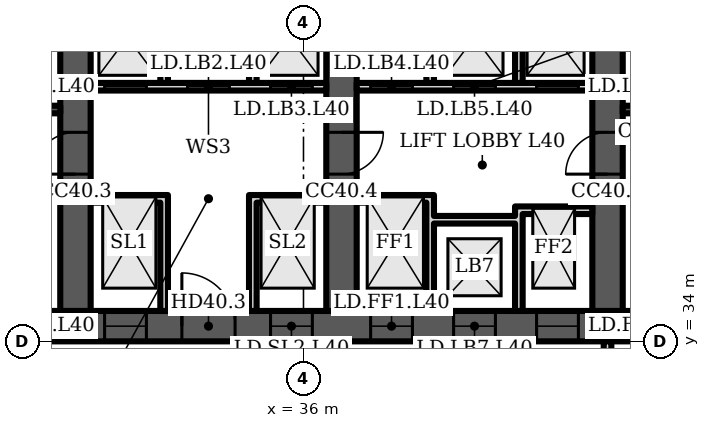
"""IFC4 building model, lengths in metres.
Left out: names, types, materials, properties, quantities, classifications, styles, units other than length and angle.
Written with IfcOpenShell. Run it as: python <this file> out.ifc"""

import sys

from ifc_helpers import new_model, si_unit, direction, frame, frame_2d, origin, place, context, subcontext, project, spatial, polyline, rectangle, outline, extrude, element, fill, save


model = new_model("IFC4")
c1 = context("Model", 3, precision=1e-05, world=origin(), true_north=direction((0.0, 1.0)))
c2 = subcontext(c1, "Body", "Model", "MODEL_VIEW")
j1 = project(units=[si_unit("LENGTHUNIT", "METRE"), si_unit("PLANEANGLEUNIT", "RADIAN")], contexts=[c1])
p1 = place(None, origin())
s1 = spatial("IfcSite", under=j1, at=p1, CompositionType="ELEMENT")
p2 = place(p1, origin())
s2 = spatial("IfcBuilding", under=s1, at=p2, CompositionType="ELEMENT")
p3 = place(p2, frame((0.0, 0.0, 166.3)))
s3 = spatial("IfcBuildingStorey", under=s2, at=p3, CompositionType="ELEMENT", Elevation=166.3)
p4 = place(p3, frame((16.0, 34.4, 0.0), z_axis=(0.0, 0.0, 1.0), x_axis=(1.0, 0.0, 0.0)))
e1 = element("IfcWall", 1, at=p4, inside=s3, PredefinedType="SHEAR", context=c2, shape_type="SweptSolid", body=[
    extrude(rectangle(XDim=42.0, YDim=0.8, at=frame_2d((21.0, 0.0))), origin(), (0.0, 0.0, 1.0), 3.6),
])
p5 = place(p4, frame((3.2, 0.0, 0.0)))
e2 = element("IfcOpeningElement", 2, at=p5, cuts=e1, PredefinedType="OPENING", context=c2, shape_type="SweptSolid", body=[
    extrude(rectangle(XDim=1.0, YDim=2.1, at=frame_2d((0.5, 1.05))), frame((0.0, 0.41, 0.0), z_axis=(0.0, -1.0, 0.0), x_axis=(1.0, 0.0, 0.0)), (0.0, 0.0, 1.0), 0.82),
])
p6 = place(p4, frame((7.65, 0.0, 0.0)))
e3 = element("IfcOpeningElement", 3, at=p6, cuts=e1, PredefinedType="OPENING", context=c2, shape_type="SweptSolid", body=[
    extrude(rectangle(XDim=1.2, YDim=2.1, at=frame_2d((0.6, 1.05))), frame((0.0, 0.41, 0.0), z_axis=(0.0, -1.0, 0.0), x_axis=(1.0, 0.0, 0.0)), (0.0, 0.0, 1.0), 0.82),
])
p7 = place(p4, frame((14.767, 0.0, 0.0)))
e4 = element("IfcOpeningElement", 4, at=p7, cuts=e1, PredefinedType="OPENING", context=c2, shape_type="SweptSolid", body=[
    extrude(rectangle(XDim=1.1, YDim=2.1, at=frame_2d((0.55, 1.05))), frame((0.0, 0.41, 0.0), z_axis=(0.0, -1.0, 0.0), x_axis=(1.0, 0.0, 0.0)), (0.0, 0.0, 1.0), 0.82),
])
p8 = place(p4, frame((19.133, 0.0, 0.0)))
e5 = element("IfcOpeningElement", 5, at=p8, cuts=e1, PredefinedType="OPENING", context=c2, shape_type="SweptSolid", body=[
    extrude(rectangle(XDim=1.1, YDim=2.1, at=frame_2d((0.55, 1.05))), frame((0.0, 0.41, 0.0), z_axis=(0.0, -1.0, 0.0), x_axis=(1.0, 0.0, 0.0)), (0.0, 0.0, 1.0), 0.82),
])
p9 = place(p4, frame((16.8, 0.0, 0.0)))
e6 = element("IfcOpeningElement", 6, at=p9, cuts=e1, PredefinedType="OPENING", context=c2, shape_type="SweptSolid", body=[
    extrude(rectangle(XDim=1.4, YDim=2.1, at=frame_2d((0.7, 1.05))), frame((0.0, 0.41, 0.0), z_axis=(0.0, -1.0, 0.0), x_axis=(1.0, 0.0, 0.0)), (0.0, 0.0, 1.0), 0.82),
])
p10 = place(p4, frame((21.767, 0.0, 0.0)))
e7 = element("IfcOpeningElement", 7, at=p10, cuts=e1, PredefinedType="OPENING", context=c2, shape_type="SweptSolid", body=[
    extrude(rectangle(XDim=1.1, YDim=2.1, at=frame_2d((0.55, 1.05))), frame((0.0, 0.41, 0.0), z_axis=(0.0, -1.0, 0.0), x_axis=(1.0, 0.0, 0.0)), (0.0, 0.0, 1.0), 0.82),
])
p11 = place(p4, frame((23.95, 0.0, 0.0)))
e8 = element("IfcOpeningElement", 8, at=p11, cuts=e1, PredefinedType="OPENING", context=c2, shape_type="SweptSolid", body=[
    extrude(rectangle(XDim=1.1, YDim=2.1, at=frame_2d((0.55, 1.05))), frame((0.0, 0.41, 0.0), z_axis=(0.0, -1.0, 0.0), x_axis=(1.0, 0.0, 0.0)), (0.0, 0.0, 1.0), 0.82),
])
p12 = place(p4, frame((26.133, 0.0, 0.0)))
e9 = element("IfcOpeningElement", 9, at=p12, cuts=e1, PredefinedType="OPENING", context=c2, shape_type="SweptSolid", body=[
    extrude(rectangle(XDim=1.1, YDim=2.1, at=frame_2d((0.55, 1.05))), frame((0.0, 0.41, 0.0), z_axis=(0.0, -1.0, 0.0), x_axis=(1.0, 0.0, 0.0)), (0.0, 0.0, 1.0), 0.82),
])
p13 = place(p4, frame((33.15, 0.0, 0.0)))
e10 = element("IfcOpeningElement", 10, at=p13, cuts=e1, PredefinedType="OPENING", context=c2, shape_type="SweptSolid", body=[
    extrude(rectangle(XDim=1.2, YDim=2.1, at=frame_2d((0.6, 1.05))), frame((0.0, 0.41, 0.0), z_axis=(0.0, -1.0, 0.0), x_axis=(1.0, 0.0, 0.0)), (0.0, 0.0, 1.0), 0.82),
])
p14 = place(p4, frame((35.817, 0.0, 0.0)))
e11 = element("IfcOpeningElement", 11, at=p14, cuts=e1, PredefinedType="OPENING", context=c2, shape_type="SweptSolid", body=[
    extrude(rectangle(XDim=1.0, YDim=2.1, at=frame_2d((0.5, 1.05))), frame((0.0, 0.41, 0.0), z_axis=(0.0, -1.0, 0.0), x_axis=(1.0, 0.0, 0.0)), (0.0, 0.0, 1.0), 0.82),
])
p15 = place(p4, frame((39.95, 0.0, 0.0)))
e12 = element("IfcOpeningElement", 12, at=p15, cuts=e1, PredefinedType="OPENING", context=c2, shape_type="SweptSolid", body=[
    extrude(rectangle(XDim=1.0, YDim=2.1, at=frame_2d((0.5, 1.05))), frame((0.0, 0.41, 0.0), z_axis=(0.0, -1.0, 0.0), x_axis=(1.0, 0.0, 0.0)), (0.0, 0.0, 1.0), 0.82),
])
p16 = place(p4, frame((37.767, 0.0, 0.0)))
e13 = element("IfcOpeningElement", 13, at=p16, cuts=e1, PredefinedType="OPENING", context=c2, shape_type="SweptSolid", body=[
    extrude(rectangle(XDim=1.4, YDim=2.1, at=frame_2d((0.7, 1.05))), frame((0.0, 0.41, 0.0), z_axis=(0.0, -1.0, 0.0), x_axis=(1.0, 0.0, 0.0)), (0.0, 0.0, 1.0), 0.82),
])
p17 = place(p3, frame((30.0, 34.8, 0.0), z_axis=(0.0, 0.0, 1.0), x_axis=(0.0, 1.0, 0.0)))
e14 = element("IfcWall", 14, at=p17, inside=s3, PredefinedType="SHEAR", context=c2, shape_type="SweptSolid", body=[
    extrude(rectangle(XDim=14.374, YDim=0.8, at=frame_2d((7.187, 0.0))), origin(), (0.0, 0.0, 1.0), 3.6),
])
p18 = place(p17, frame((3.6, 0.0, 0.0)))
e15 = element("IfcOpeningElement", 15, at=p18, cuts=e14, PredefinedType="OPENING", context=c2, shape_type="SweptSolid", body=[
    extrude(rectangle(XDim=1.1, YDim=2.1, at=frame_2d((0.55, 1.05))), frame((0.0, 0.41, 0.0), z_axis=(0.0, -1.0, 0.0), x_axis=(1.0, 0.0, 0.0)), (0.0, 0.0, 1.0), 0.82),
])
p19 = place(p3, frame((37.0, 34.8, 0.0), z_axis=(0.0, 0.0, 1.0), x_axis=(0.0, 1.0, 0.0)))
e16 = element("IfcWall", 16, at=p19, inside=s3, PredefinedType="SHEAR", context=c2, shape_type="SweptSolid", body=[
    extrude(rectangle(XDim=14.987, YDim=0.8, at=frame_2d((7.493, 0.0))), origin(), (0.0, 0.0, 1.0), 3.6),
])
p20 = place(p19, frame((11.312, 0.0, 0.0)))
e17 = element("IfcOpeningElement", 17, at=p20, cuts=e16, PredefinedType="OPENING", context=c2, shape_type="SweptSolid", body=[
    extrude(rectangle(XDim=1.0, YDim=2.1, at=frame_2d((0.5, 1.05))), frame((0.0, 0.41, 0.0), z_axis=(0.0, -1.0, 0.0), x_axis=(1.0, 0.0, 0.0)), (0.0, 0.0, 1.0), 0.82),
])
p21 = place(p19, frame((3.6, 0.0, 0.0)))
e18 = element("IfcOpeningElement", 18, at=p21, cuts=e16, PredefinedType="OPENING", context=c2, shape_type="SweptSolid", body=[
    extrude(rectangle(XDim=1.1, YDim=2.1, at=frame_2d((0.55, 1.05))), frame((0.0, 0.41, 0.0), z_axis=(0.0, -1.0, 0.0), x_axis=(1.0, 0.0, 0.0)), (0.0, 0.0, 1.0), 0.82),
])
p22 = place(p3, frame((44.0, 34.8, 0.0), z_axis=(0.0, 0.0, 1.0), x_axis=(0.0, 1.0, 0.0)))
e19 = element("IfcWall", 19, at=p22, inside=s3, PredefinedType="SHEAR", context=c2, shape_type="SweptSolid", body=[
    extrude(rectangle(XDim=14.374, YDim=0.8, at=frame_2d((7.187, 0.0))), origin(), (0.0, 0.0, 1.0), 3.6),
])
p23 = place(p22, frame((11.312, 0.0, 0.0)))
e20 = element("IfcOpeningElement", 20, at=p23, cuts=e19, PredefinedType="OPENING", context=c2, shape_type="SweptSolid", body=[
    extrude(rectangle(XDim=1.0, YDim=2.1, at=frame_2d((0.5, 1.05))), frame((0.0, 0.41, 0.0), z_axis=(0.0, -1.0, 0.0), x_axis=(1.0, 0.0, 0.0)), (0.0, 0.0, 1.0), 0.82),
])
p24 = place(p22, frame((3.6, 0.0, 0.0)))
e21 = element("IfcOpeningElement", 21, at=p24, cuts=e19, PredefinedType="OPENING", context=c2, shape_type="SweptSolid", body=[
    extrude(rectangle(XDim=1.1, YDim=2.1, at=frame_2d((0.55, 1.05))), frame((0.0, 0.41, 0.0), z_axis=(0.0, -1.0, 0.0), x_axis=(1.0, 0.0, 0.0)), (0.0, 0.0, 1.0), 0.82),
])
p25 = place(p3, frame((23.4, 40.1, 0.0), z_axis=(0.0, 0.0, 1.0), x_axis=(1.0, 0.0, 0.0)))
e22 = element("IfcWall", 22, at=p25, inside=s3, PredefinedType="SHEAR", context=c2, shape_type="SweptSolid", body=[
    extrude(rectangle(XDim=6.2, YDim=0.2, at=frame_2d((3.1, 0.0))), origin(), (0.0, 0.0, 1.0), 3.2),
])
p26 = place(p25, frame((3.525, 0.0, 0.0)))
e23 = element("IfcOpeningElement", 23, at=p26, cuts=e22, PredefinedType="OPENING", context=c2, shape_type="SweptSolid", body=[
    extrude(rectangle(XDim=1.2, YDim=2.1, at=frame_2d((0.6, 1.05))), frame((0.0, 0.11, 0.0), z_axis=(0.0, -1.0, 0.0), x_axis=(1.0, 0.0, 0.0)), (0.0, 0.0, 1.0), 0.22),
])
p27 = place(p25, frame((0.575, 0.0, 0.0)))
e24 = element("IfcOpeningElement", 24, at=p27, cuts=e22, PredefinedType="OPENING", context=c2, shape_type="SweptSolid", body=[
    extrude(rectangle(XDim=0.9, YDim=2.1, at=frame_2d((0.45, 1.05))), frame((0.0, 0.11, 0.0), z_axis=(0.0, -1.0, 0.0), x_axis=(1.0, 0.0, 0.0)), (0.0, 0.0, 1.0), 0.22),
])
p28 = place(p3, frame((30.4, 40.7, 0.0), z_axis=(0.0, 0.0, 1.0), x_axis=(1.0, 0.0, 0.0)))
e25 = element("IfcWall", 25, at=p28, inside=s3, PredefinedType="PARTITIONING", context=c2, shape_type="SweptSolid", body=[
    extrude(rectangle(XDim=6.2, YDim=0.2, at=frame_2d((3.1, 0.0))), origin(), (0.0, 0.0, 1.0), 3.2),
])
p29 = place(p28, frame((0.367, 0.0, 0.0)))
e26 = element("IfcOpeningElement", 26, at=p29, cuts=e25, PredefinedType="OPENING", context=c2, shape_type="SweptSolid", body=[
    extrude(rectangle(XDim=1.1, YDim=2.1, at=frame_2d((0.55, 1.05))), frame((0.0, 0.11, 0.0), z_axis=(0.0, -1.0, 0.0), x_axis=(1.0, 0.0, 0.0)), (0.0, 0.0, 1.0), 0.22),
])
p30 = place(p28, frame((2.55, 0.0, 0.0)))
e27 = element("IfcOpeningElement", 27, at=p30, cuts=e25, PredefinedType="OPENING", context=c2, shape_type="SweptSolid", body=[
    extrude(rectangle(XDim=1.1, YDim=2.1, at=frame_2d((0.55, 1.05))), frame((0.0, 0.11, 0.0), z_axis=(0.0, -1.0, 0.0), x_axis=(1.0, 0.0, 0.0)), (0.0, 0.0, 1.0), 0.22),
])
p31 = place(p28, frame((4.733, 0.0, 0.0)))
e28 = element("IfcOpeningElement", 28, at=p31, cuts=e25, PredefinedType="OPENING", context=c2, shape_type="SweptSolid", body=[
    extrude(rectangle(XDim=1.1, YDim=2.1, at=frame_2d((0.55, 1.05))), frame((0.0, 0.11, 0.0), z_axis=(0.0, -1.0, 0.0), x_axis=(1.0, 0.0, 0.0)), (0.0, 0.0, 1.0), 0.22),
])
p32 = place(p3, frame((0.0, 0.0, -0.0)))
e29 = element("IfcWall", 29, at=p32, inside=s3, PredefinedType="PARTITIONING", context=c2, shape_type="SweptSolid", body=[
    extrude(outline(polyline([(32.233, 37.65), (30.4, 37.65), (30.4, 37.85), (32.233, 37.85), (32.433, 37.85), (32.433, 34.8), (32.233, 34.8), (32.233, 37.65)])), origin(), (0.0, 0.0, 1.0), 3.2),
])
p33 = place(p3, frame((0.0, 0.0, -0.0)))
e30 = element("IfcWall", 30, at=p33, inside=s3, PredefinedType="PARTITIONING", context=c2, shape_type="SweptSolid", body=[
    extrude(outline(polyline([(34.567, 37.85), (34.767, 37.85), (36.6, 37.85), (36.6, 37.65), (34.767, 37.65), (34.767, 34.8), (34.567, 34.8), (34.567, 37.85)])), origin(), (0.0, 0.0, 1.0), 3.2),
])
p34 = place(p3, frame((0.0, 0.0, -0.0)))
e31 = element("IfcWall", 31, at=p34, inside=s3, PredefinedType="PARTITIONING", context=c2, shape_type="SweptSolid", body=[
    extrude(outline(polyline([(32.433, 40.8), (32.233, 40.8), (32.233, 43.8), (30.4, 43.8), (30.4, 44.0), (36.6, 44.0), (36.6, 43.8), (34.767, 43.8), (34.767, 40.8), (34.567, 40.8), (34.567, 43.8), (32.433, 43.8), (32.433, 40.8)])), origin(), (0.0, 0.0, 1.0), 3.2),
])
p35 = place(p3, frame((37.4, 40.7, 0.0), z_axis=(0.0, 0.0, 1.0), x_axis=(1.0, 0.0, 0.0)))
e32 = element("IfcWall", 32, at=p35, inside=s3, PredefinedType="PARTITIONING", context=c2, shape_type="SweptSolid", body=[
    extrude(rectangle(XDim=6.2, YDim=0.2, at=frame_2d((3.1, 0.0))), origin(), (0.0, 0.0, 1.0), 3.2),
])
p36 = place(p35, frame((0.367, 0.0, 0.0)))
e33 = element("IfcOpeningElement", 33, at=p36, cuts=e32, PredefinedType="OPENING", context=c2, shape_type="SweptSolid", body=[
    extrude(rectangle(XDim=1.1, YDim=2.1, at=frame_2d((0.55, 1.05))), frame((0.0, 0.11, 0.0), z_axis=(0.0, -1.0, 0.0), x_axis=(1.0, 0.0, 0.0)), (0.0, 0.0, 1.0), 0.22),
])
p37 = place(p35, frame((2.55, 0.0, 0.0)))
e34 = element("IfcOpeningElement", 34, at=p37, cuts=e32, PredefinedType="OPENING", context=c2, shape_type="SweptSolid", body=[
    extrude(rectangle(XDim=1.1, YDim=2.1, at=frame_2d((0.55, 1.05))), frame((0.0, 0.11, 0.0), z_axis=(0.0, -1.0, 0.0), x_axis=(1.0, 0.0, 0.0)), (0.0, 0.0, 1.0), 0.22),
])
p38 = place(p35, frame((4.733, 0.0, 0.0)))
e35 = element("IfcOpeningElement", 35, at=p38, cuts=e32, PredefinedType="OPENING", context=c2, shape_type="SweptSolid", body=[
    extrude(rectangle(XDim=1.1, YDim=2.1, at=frame_2d((0.55, 1.05))), frame((0.0, 0.11, 0.0), z_axis=(0.0, -1.0, 0.0), x_axis=(1.0, 0.0, 0.0)), (0.0, 0.0, 1.0), 0.22),
])
p39 = place(p3, frame((0.0, 0.0, -0.0)))
e36 = element("IfcWall", 36, at=p39, inside=s3, PredefinedType="PARTITIONING", context=c2, shape_type="SweptSolid", body=[
    extrude(outline(polyline([(41.567, 37.1), (39.433, 37.1), (39.433, 34.8), (39.233, 34.8), (39.233, 37.65), (37.4, 37.65), (37.4, 37.85), (39.233, 37.85), (39.433, 37.85), (39.433, 37.3), (41.567, 37.3), (41.567, 37.55), (41.767, 37.55), (43.6, 37.55), (43.6, 37.35), (41.767, 37.35), (41.767, 34.8), (41.567, 34.8), (41.567, 37.1)])), origin(), (0.0, 0.0, 1.0), 3.2),
])
p40 = place(p3, frame((0.0, 0.0, -0.0)))
e37 = element("IfcWall", 37, at=p40, inside=s3, PredefinedType="PARTITIONING", context=c2, shape_type="SweptSolid", body=[
    extrude(outline(polyline([(39.433, 40.8), (39.233, 40.8), (39.233, 43.8), (37.4, 43.8), (37.4, 44.0), (43.6, 44.0), (43.6, 43.8), (41.767, 43.8), (41.767, 40.8), (41.567, 40.8), (41.567, 43.8), (39.433, 43.8), (39.433, 40.8)])), origin(), (0.0, 0.0, 1.0), 3.2),
])
p41 = place(p3, frame((44.4, 40.1, 0.0), z_axis=(0.0, 0.0, 1.0), x_axis=(1.0, 0.0, 0.0)))
e38 = element("IfcWall", 38, at=p41, inside=s3, PredefinedType="SHEAR", context=c2, shape_type="SweptSolid", body=[
    extrude(rectangle(XDim=6.2, YDim=0.2, at=frame_2d((3.1, 0.0))), origin(), (0.0, 0.0, 1.0), 3.2),
])
p42 = place(p41, frame((3.525, 0.0, 0.0)))
e39 = element("IfcOpeningElement", 39, at=p42, cuts=e38, PredefinedType="OPENING", context=c2, shape_type="SweptSolid", body=[
    extrude(rectangle(XDim=1.2, YDim=2.1, at=frame_2d((0.6, 1.05))), frame((0.0, 0.11, 0.0), z_axis=(0.0, -1.0, 0.0), x_axis=(1.0, 0.0, 0.0)), (0.0, 0.0, 1.0), 0.22),
])
p43 = place(p41, frame((0.575, 0.0, 0.0)))
e40 = element("IfcOpeningElement", 40, at=p43, cuts=e38, PredefinedType="OPENING", context=c2, shape_type="SweptSolid", body=[
    extrude(rectangle(XDim=0.9, YDim=2.1, at=frame_2d((0.45, 1.05))), frame((0.0, 0.11, 0.0), z_axis=(0.0, -1.0, 0.0), x_axis=(1.0, 0.0, 0.0)), (0.0, 0.0, 1.0), 0.22),
])
p44 = place(p3, frame((37.0, 30.5, 0.0), z_axis=(0.0, 0.0, 1.0), x_axis=(0.0, 1.0, 0.0)))
e41 = element("IfcWall", 41, at=p44, inside=s3, PredefinedType="PARTITIONING", context=c2, shape_type="SweptSolid", body=[
    extrude(rectangle(XDim=3.5, YDim=0.2, at=frame_2d((1.75, 0.0))), origin(), (0.0, 0.0, 1.0), 3.2),
])
p45 = place(p44, frame((1.2, 0.0, 0.0)))
e42 = element("IfcOpeningElement", 42, at=p45, cuts=e41, PredefinedType="OPENING", context=c2, shape_type="SweptSolid", body=[
    extrude(rectangle(XDim=1.1, YDim=2.1, at=frame_2d((0.55, 1.05))), frame((0.0, 0.11, 0.0), z_axis=(0.0, -1.0, 0.0), x_axis=(1.0, 0.0, 0.0)), (0.0, 0.0, 1.0), 0.22),
])
for number, where, z_axis, x_axis in (
    (43, (40.0, 30.5, 0.0), (0.0, 0.0, 1.0), (0.0, 1.0, 0.0)),
    (44, (41.0, 30.5, 0.0), (0.0, 0.0, 1.0), (0.0, 1.0, 0.0)),
):
    element("IfcWall", number, at=place(p3, frame(where, z_axis=z_axis, x_axis=x_axis)), inside=s3, PredefinedType="PARTITIONING", context=c2, shape_type="SweptSolid", body=[
        extrude(rectangle(XDim=3.5, YDim=0.2, at=frame_2d((1.75, 0.0))), origin(), (0.0, 0.0, 1.0), 3.2),
    ])
p46 = place(p3, frame((44.0, 30.5, 0.0), z_axis=(0.0, 0.0, 1.0), x_axis=(0.0, 1.0, 0.0)))
e45 = element("IfcWall", 45, at=p46, inside=s3, PredefinedType="PARTITIONING", context=c2, shape_type="SweptSolid", body=[
    extrude(rectangle(XDim=3.5, YDim=0.2, at=frame_2d((1.75, 0.0))), origin(), (0.0, 0.0, 1.0), 3.2),
])
p47 = place(p46, frame((1.2, 0.0, 0.0)))
e46 = element("IfcOpeningElement", 46, at=p47, cuts=e45, PredefinedType="OPENING", context=c2, shape_type="SweptSolid", body=[
    extrude(rectangle(XDim=1.1, YDim=2.1, at=frame_2d((0.55, 1.05))), frame((0.0, 0.11, 0.0), z_axis=(0.0, -1.0, 0.0), x_axis=(1.0, 0.0, 0.0)), (0.0, 0.0, 1.0), 0.22),
])
p48 = place(p7, origin())
e47 = element("IfcDoor", 47, at=p48, inside=s3, OperationType="DOUBLE_DOOR_SLIDING", PredefinedType="DOOR", context=c2, shape_type="SweptSolid", body=[
    extrude(rectangle(XDim=1.1, YDim=2.1, at=frame_2d((0.55, 1.05))), frame((0.0, 0.025, 0.0), z_axis=(0.0, -1.0, 0.0), x_axis=(1.0, 0.0, 0.0)), (0.0, 0.0, 1.0), 0.05),
])
fill(e4, e47)
p49 = place(p8, origin())
e48 = element("IfcDoor", 48, at=p49, inside=s3, OperationType="DOUBLE_DOOR_SLIDING", PredefinedType="DOOR", context=c2, shape_type="SweptSolid", body=[
    extrude(rectangle(XDim=1.1, YDim=2.1, at=frame_2d((0.55, 1.05))), frame((0.0, 0.025, 0.0), z_axis=(0.0, -1.0, 0.0), x_axis=(1.0, 0.0, 0.0)), (0.0, 0.0, 1.0), 0.05),
])
fill(e5, e48)
p50 = place(p9, origin())
e49 = element("IfcDoor", 49, at=p50, inside=s3, OperationType="DOUBLE_DOOR_SINGLE_SWING", PredefinedType="DOOR", context=c2, shape_type="SweptSolid", body=[
    extrude(rectangle(XDim=1.4, YDim=2.1, at=frame_2d((0.7, 1.05))), frame((0.0, 0.025, 0.0), z_axis=(0.0, -1.0, 0.0), x_axis=(1.0, 0.0, 0.0)), (0.0, 0.0, 1.0), 0.05),
])
fill(e6, e49)
p51 = place(p29, origin())
e50 = element("IfcDoor", 50, at=p51, inside=s3, OperationType="DOUBLE_DOOR_SLIDING", PredefinedType="DOOR", context=c2, shape_type="SweptSolid", body=[
    extrude(rectangle(XDim=1.1, YDim=2.1, at=frame_2d((0.55, 1.05))), frame((0.0, 0.025, 0.0), z_axis=(0.0, -1.0, 0.0), x_axis=(1.0, 0.0, 0.0)), (0.0, 0.0, 1.0), 0.05),
])
fill(e26, e50)
p52 = place(p30, origin())
e51 = element("IfcDoor", 51, at=p52, inside=s3, OperationType="DOUBLE_DOOR_SLIDING", PredefinedType="DOOR", context=c2, shape_type="SweptSolid", body=[
    extrude(rectangle(XDim=1.1, YDim=2.1, at=frame_2d((0.55, 1.05))), frame((0.0, 0.025, 0.0), z_axis=(0.0, -1.0, 0.0), x_axis=(1.0, 0.0, 0.0)), (0.0, 0.0, 1.0), 0.05),
])
fill(e27, e51)
p53 = place(p31, origin())
e52 = element("IfcDoor", 52, at=p53, inside=s3, OperationType="DOUBLE_DOOR_SLIDING", PredefinedType="DOOR", context=c2, shape_type="SweptSolid", body=[
    extrude(rectangle(XDim=1.1, YDim=2.1, at=frame_2d((0.55, 1.05))), frame((0.0, 0.025, 0.0), z_axis=(0.0, -1.0, 0.0), x_axis=(1.0, 0.0, 0.0)), (0.0, 0.0, 1.0), 0.05),
])
fill(e28, e52)
p54 = place(p10, origin())
e53 = element("IfcDoor", 53, at=p54, inside=s3, OperationType="DOUBLE_DOOR_SLIDING", PredefinedType="DOOR", context=c2, shape_type="SweptSolid", body=[
    extrude(rectangle(XDim=1.1, YDim=2.1, at=frame_2d((0.55, 1.05))), frame((0.0, 0.025, 0.0), z_axis=(0.0, -1.0, 0.0), x_axis=(1.0, 0.0, 0.0)), (0.0, 0.0, 1.0), 0.05),
])
fill(e7, e53)
p55 = place(p11, origin())
e54 = element("IfcDoor", 54, at=p55, inside=s3, OperationType="DOUBLE_DOOR_SLIDING", PredefinedType="DOOR", context=c2, shape_type="SweptSolid", body=[
    extrude(rectangle(XDim=1.1, YDim=2.1, at=frame_2d((0.55, 1.05))), frame((0.0, 0.025, 0.0), z_axis=(0.0, -1.0, 0.0), x_axis=(1.0, 0.0, 0.0)), (0.0, 0.0, 1.0), 0.05),
])
fill(e8, e54)
p56 = place(p12, origin())
e55 = element("IfcDoor", 55, at=p56, inside=s3, OperationType="DOUBLE_DOOR_SLIDING", PredefinedType="DOOR", context=c2, shape_type="SweptSolid", body=[
    extrude(rectangle(XDim=1.1, YDim=2.1, at=frame_2d((0.55, 1.05))), frame((0.0, 0.025, 0.0), z_axis=(0.0, -1.0, 0.0), x_axis=(1.0, 0.0, 0.0)), (0.0, 0.0, 1.0), 0.05),
])
fill(e9, e55)
p57 = place(p36, origin())
e56 = element("IfcDoor", 56, at=p57, inside=s3, OperationType="DOUBLE_DOOR_SLIDING", PredefinedType="DOOR", context=c2, shape_type="SweptSolid", body=[
    extrude(rectangle(XDim=1.1, YDim=2.1, at=frame_2d((0.55, 1.05))), frame((0.0, 0.025, 0.0), z_axis=(0.0, -1.0, 0.0), x_axis=(1.0, 0.0, 0.0)), (0.0, 0.0, 1.0), 0.05),
])
fill(e33, e56)
p58 = place(p37, origin())
e57 = element("IfcDoor", 57, at=p58, inside=s3, OperationType="DOUBLE_DOOR_SLIDING", PredefinedType="DOOR", context=c2, shape_type="SweptSolid", body=[
    extrude(rectangle(XDim=1.1, YDim=2.1, at=frame_2d((0.55, 1.05))), frame((0.0, 0.025, 0.0), z_axis=(0.0, -1.0, 0.0), x_axis=(1.0, 0.0, 0.0)), (0.0, 0.0, 1.0), 0.05),
])
fill(e34, e57)
p59 = place(p38, origin())
e58 = element("IfcDoor", 58, at=p59, inside=s3, OperationType="DOUBLE_DOOR_SLIDING", PredefinedType="DOOR", context=c2, shape_type="SweptSolid", body=[
    extrude(rectangle(XDim=1.1, YDim=2.1, at=frame_2d((0.55, 1.05))), frame((0.0, 0.025, 0.0), z_axis=(0.0, -1.0, 0.0), x_axis=(1.0, 0.0, 0.0)), (0.0, 0.0, 1.0), 0.05),
])
fill(e35, e58)
p60 = place(p18, origin())
e59 = element("IfcDoor", 59, at=p60, inside=s3, OperationType="SINGLE_SWING_LEFT", PredefinedType="DOOR", context=c2, shape_type="SweptSolid", body=[
    extrude(rectangle(XDim=1.1, YDim=2.1, at=frame_2d((0.55, 1.05))), frame((0.0, 0.025, 0.0), z_axis=(0.0, -1.0, 0.0), x_axis=(1.0, 0.0, 0.0)), (0.0, 0.0, 1.0), 0.05),
])
fill(e15, e59)
p61 = place(p21, origin())
e60 = element("IfcDoor", 60, at=p61, inside=s3, OperationType="SINGLE_SWING_RIGHT", PredefinedType="DOOR", context=c2, shape_type="SweptSolid", body=[
    extrude(rectangle(XDim=1.1, YDim=2.1, at=frame_2d((0.55, 1.05))), frame((0.0, 0.025, 0.0), z_axis=(0.0, -1.0, 0.0), x_axis=(1.0, 0.0, 0.0)), (0.0, 0.0, 1.0), 0.05),
])
fill(e18, e60)
p62 = place(p24, origin())
e61 = element("IfcDoor", 61, at=p62, inside=s3, OperationType="SINGLE_SWING_LEFT", PredefinedType="DOOR", context=c2, shape_type="SweptSolid", body=[
    extrude(rectangle(XDim=1.1, YDim=2.1, at=frame_2d((0.55, 1.05))), frame((0.0, 0.025, 0.0), z_axis=(0.0, -1.0, 0.0), x_axis=(1.0, 0.0, 0.0)), (0.0, 0.0, 1.0), 0.05),
])
fill(e21, e61)
save(model, sys.argv[1])
